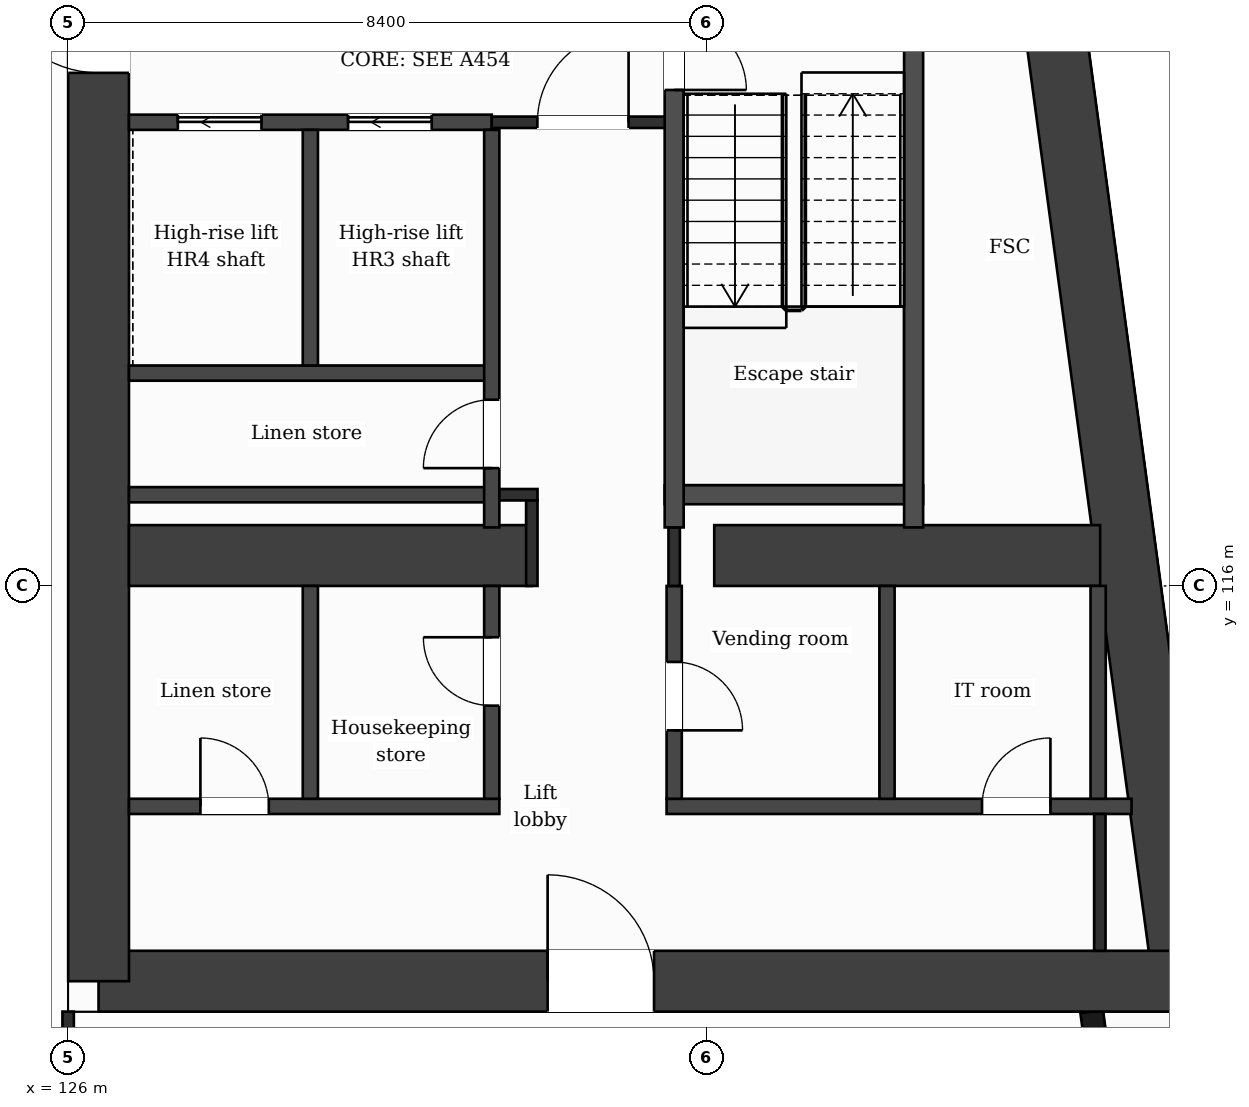
"""IFC4 building model, lengths in metres.
Left out: names, types, materials, properties, quantities, classifications, styles, units other than length and angle.
Written with IfcOpenShell. Run it as: python <this file> out.ifc"""

import sys

from ifc_helpers import new_model, si_unit, direction, frame, frame_2d, origin, place, context, subcontext, project, spatial, rectangle, extrude, element, fill, save


model = new_model("IFC4")
c1 = context("Model", 3, precision=1e-05, world=origin(), true_north=direction((0.0, 1.0)))
c2 = subcontext(c1, "Body", "Model", "MODEL_VIEW")
j1 = project(units=[si_unit("LENGTHUNIT", "METRE"), si_unit("PLANEANGLEUNIT", "RADIAN")], contexts=[c1])
p1 = place(None, origin())
s1 = spatial("IfcSite", under=j1, at=p1, CompositionType="ELEMENT")
p2 = place(p1, origin())
s2 = spatial("IfcBuilding", under=s1, at=p2, CompositionType="ELEMENT")
p3 = place(p2, frame((0.0, 0.0, 220.7)))
s3 = spatial("IfcBuildingStorey", under=s2, at=p3, CompositionType="ELEMENT", Elevation=220.7)
p4 = place(p3, frame((137.82, 132.0, 0.0), z_axis=(0.0, 0.0, 1.0), x_axis=(0.133408347329, -0.991061154956, 0.0)))
e1 = element("IfcWall", 1, at=p4, inside=s3, PredefinedType="SHEAR", context=c2, shape_type="SweptSolid", body=[
    extrude(rectangle(XDim=21.391, YDim=0.8, at=frame_2d((10.696, 0.0))), origin(), (0.0, 0.0, 1.0), 3.7),
])
p5 = place(p3, frame((140.673, 110.8, 0.0), z_axis=(0.0, 0.0, 1.0), x_axis=(-1.0, 0.0, 0.0)))
e2 = element("IfcWall", 2, at=p5, inside=s3, PredefinedType="SHEAR", context=c2, shape_type="SweptSolid", body=[
    extrude(rectangle(XDim=14.273, YDim=0.8, at=frame_2d((7.137, 0.0))), origin(), (0.0, 0.0, 1.0), 3.7),
])
p6 = place(p5, frame((6.965, 0.0, 0.0)))
e3 = element("IfcOpeningElement", 3, at=p6, cuts=e2, PredefinedType="OPENING", context=c2, shape_type="SweptSolid", body=[
    extrude(rectangle(XDim=1.4, YDim=2.1, at=frame_2d((0.7, 1.05))), frame((0.0, 0.41, 0.0), z_axis=(0.0, -1.0, 0.0), x_axis=(1.0, 0.0, 0.0)), (0.0, 0.0, 1.0), 0.82),
])
p7 = place(p3, frame((126.4, 110.8, 0.0), z_axis=(0.0, 0.0, 1.0), x_axis=(0.0, 1.0, 0.0)))
e4 = element("IfcWall", 4, at=p7, inside=s3, PredefinedType="SHEAR", context=c2, shape_type="SweptSolid", body=[
    extrude(rectangle(XDim=21.2, YDim=0.8, at=frame_2d((10.6, 0.0))), origin(), (0.0, 0.0, 1.0), 3.7),
])
p8 = place(p7, frame((11.95, 0.0, 0.0)))
e5 = element("IfcOpeningElement", 5, at=p8, cuts=e4, PredefinedType="OPENING", context=c2, shape_type="SweptSolid", body=[
    extrude(rectangle(XDim=1.4, YDim=2.1, at=frame_2d((0.7, 1.05))), frame((0.0, 0.41, 0.0), z_axis=(0.0, -1.0, 0.0), x_axis=(1.0, 0.0, 0.0)), (0.0, 0.0, 1.0), 0.82),
])
p9 = place(p3, frame((126.8, 116.4, 0.0), z_axis=(0.0, 0.0, 1.0), x_axis=(1.0, 0.0, 0.0)))
e6 = element("IfcWall", 6, at=p9, inside=s3, PredefinedType="SHEAR", context=c2, shape_type="SweptSolid", body=[
    extrude(rectangle(XDim=5.3, YDim=0.8, at=frame_2d((2.65, 0.0))), origin(), (0.0, 0.0, 1.0), 3.7),
])
p10 = place(p3, frame((134.5, 116.4, 0.0), z_axis=(0.0, 0.0, 1.0), x_axis=(1.0, 0.0, 0.0)))
e7 = element("IfcWall", 7, at=p10, inside=s3, PredefinedType="SHEAR", context=c2, shape_type="SweptSolid", body=[
    extrude(rectangle(XDim=5.077, YDim=0.8, at=frame_2d((2.539, 0.0))), origin(), (0.0, 0.0, 1.0), 3.7),
])
p11 = place(p3, frame((140.348, 103.85, 0.0), z_axis=(0.0, 0.0, 1.0), x_axis=(-0.133431549479, 0.991058031401, 0.0)))
e8 = element("IfcWall", 8, at=p11, inside=s3, PredefinedType="SOLIDWALL", context=c2, shape_type="SweptSolid", body=[
    extrude(rectangle(XDim=6.609, YDim=0.3, at=frame_2d((3.304, 0.0))), origin(), (0.0, 0.0, 1.0), 3.38),
])
p12 = place(p11, frame((0.737, 0.0, 0.9)))
e9 = element("IfcOpeningElement", 9, at=p12, cuts=e8, PredefinedType="OPENING", context=c2, shape_type="SweptSolid", body=[
    extrude(rectangle(XDim=1.2, YDim=2.1, at=frame_2d((0.6, 1.05))), frame((0.0, 0.16, 0.0), z_axis=(0.0, -1.0, 0.0), x_axis=(1.0, 0.0, 0.0)), (0.0, 0.0, 1.0), 0.32),
])
p13 = place(p11, frame((3.991, 0.0, 0.0)))
e10 = element("IfcOpeningElement", 10, at=p13, cuts=e8, PredefinedType="OPENING", context=c2, shape_type="SweptSolid", body=[
    extrude(rectangle(XDim=1.2, YDim=2.4, at=frame_2d((0.6, 1.2))), frame((0.0, 0.16, 0.0), z_axis=(0.0, -1.0, 0.0), x_axis=(1.0, 0.0, 0.0)), (0.0, 0.0, 1.0), 0.32),
])
p14 = place(p3, frame((126.8, 113.1, 0.0), z_axis=(0.0, 0.0, 1.0), x_axis=(1.0, 0.0, 0.0)))
e11 = element("IfcWall", 11, at=p14, inside=s3, PredefinedType="PARTITIONING", context=c2, shape_type="SweptSolid", body=[
    extrude(rectangle(XDim=4.873, YDim=0.2, at=frame_2d((2.437, 0.0))), origin(), (0.0, 0.0, 1.0), 3.38),
])
p15 = place(p14, frame((0.94, 0.0, 0.0)))
e12 = element("IfcOpeningElement", 12, at=p15, cuts=e11, PredefinedType="OPENING", context=c2, shape_type="SweptSolid", body=[
    extrude(rectangle(XDim=0.9, YDim=2.1, at=frame_2d((0.45, 1.05))), frame((0.0, 0.11, 0.0), z_axis=(0.0, -1.0, 0.0), x_axis=(1.0, 0.0, 0.0)), (0.0, 0.0, 1.0), 0.22),
])
p16 = place(p3, frame((133.873, 113.1, 0.0), z_axis=(0.0, 0.0, 1.0), x_axis=(1.0, 0.0, 0.0)))
e13 = element("IfcWall", 13, at=p16, inside=s3, PredefinedType="PARTITIONING", context=c2, shape_type="SweptSolid", body=[
    extrude(rectangle(XDim=6.117, YDim=0.2, at=frame_2d((3.059, 0.0))), origin(), (0.0, 0.0, 1.0), 3.38),
])
p17 = place(p16, frame((4.15, 0.0, 0.0)))
e14 = element("IfcOpeningElement", 14, at=p17, cuts=e13, PredefinedType="OPENING", context=c2, shape_type="SweptSolid", body=[
    extrude(rectangle(XDim=0.9, YDim=2.1, at=frame_2d((0.45, 1.05))), frame((0.0, 0.11, 0.0), z_axis=(0.0, -1.0, 0.0), x_axis=(1.0, 0.0, 0.0)), (0.0, 0.0, 1.0), 0.22),
])
p18 = place(p3, frame((126.8, 117.2, 0.0), z_axis=(0.0, 0.0, 1.0), x_axis=(1.0, 0.0, 0.0)))
e15 = element("IfcWall", 15, at=p18, inside=s3, PredefinedType="PARTITIONING", context=c2, shape_type="SweptSolid", body=[
    extrude(rectangle(XDim=4.773, YDim=0.2, at=frame_2d((2.386, 0.0))), origin(), (0.0, 0.0, 1.0), 3.38),
])
p19 = place(p3, frame((131.573, 117.2, 0.0), z_axis=(0.0, 0.0, 1.0), x_axis=(1.0, 0.0, 0.0)))
e16 = element("IfcWall", 16, at=p19, inside=s3, PredefinedType="PARTITIONING", context=c2, shape_type="SweptSolid", body=[
    extrude(rectangle(XDim=0.602, YDim=0.15, at=frame_2d((0.301, 0.0))), origin(), (0.0, 0.0, 1.0), 3.38),
])
p20 = place(p3, frame((133.848, 117.2, 0.0), z_axis=(0.0, 0.0, 1.0), x_axis=(1.0, 0.0, 0.0)))
e17 = element("IfcWall", 17, at=p20, inside=s3, PredefinedType="PARTITIONING", context=c2, shape_type="SweptSolid", body=[
    extrude(rectangle(XDim=3.4, YDim=0.25, at=frame_2d((1.7, 0.0))), origin(), (0.0, 0.0, 1.0), 3.38),
])
p21 = place(p3, frame((126.8, 118.8, 0.0), z_axis=(0.0, 0.0, 1.0), x_axis=(1.0, 0.0, 0.0)))
e18 = element("IfcWall", 18, at=p21, inside=s3, PredefinedType="PARTITIONING", context=c2, shape_type="SweptSolid", body=[
    extrude(rectangle(XDim=4.773, YDim=0.2, at=frame_2d((2.386, 0.0))), origin(), (0.0, 0.0, 1.0), 3.38),
])
p22 = place(p3, frame((126.8, 122.1, 0.0), z_axis=(0.0, 0.0, 1.0), x_axis=(1.0, 0.0, 0.0)))
e19 = element("IfcWall", 19, at=p22, inside=s3, PredefinedType="PARTITIONING", context=c2, shape_type="SweptSolid", body=[
    extrude(rectangle(XDim=4.773, YDim=0.2, at=frame_2d((2.386, 0.0))), origin(), (0.0, 0.0, 1.0), 3.38),
])
p23 = place(p22, frame((2.883, 0.0, 0.0)))
e20 = element("IfcOpeningElement", 20, at=p23, cuts=e19, PredefinedType="OPENING", context=c2, shape_type="SweptSolid", body=[
    extrude(rectangle(XDim=1.1, YDim=2.1, at=frame_2d((0.55, 1.05))), frame((0.0, 0.11, 0.0), z_axis=(0.0, -1.0, 0.0), x_axis=(1.0, 0.0, 0.0)), (0.0, 0.0, 1.0), 0.22),
])
p24 = place(p22, frame((0.643, 0.0, 0.0)))
e21 = element("IfcOpeningElement", 21, at=p24, cuts=e19, PredefinedType="OPENING", context=c2, shape_type="SweptSolid", body=[
    extrude(rectangle(XDim=1.1, YDim=2.1, at=frame_2d((0.55, 1.05))), frame((0.0, 0.11, 0.0), z_axis=(0.0, -1.0, 0.0), x_axis=(1.0, 0.0, 0.0)), (0.0, 0.0, 1.0), 0.22),
])
p25 = place(p3, frame((131.573, 122.1, 0.0), z_axis=(0.0, 0.0, 1.0), x_axis=(1.0, 0.0, 0.0)))
e22 = element("IfcWall", 22, at=p25, inside=s3, PredefinedType="PARTITIONING", context=c2, shape_type="SweptSolid", body=[
    extrude(rectangle(XDim=2.4, YDim=0.15, at=frame_2d((1.2, 0.0))), origin(), (0.0, 0.0, 1.0), 3.38),
])
p26 = place(p25, frame((0.6, 0.0, 0.0)))
e23 = element("IfcOpeningElement", 23, at=p26, cuts=e22, PredefinedType="OPENING", context=c2, shape_type="SweptSolid", body=[
    extrude(rectangle(XDim=1.2, YDim=2.1, at=frame_2d((0.6, 1.05))), frame((0.0, 0.085, 0.0), z_axis=(0.0, -1.0, 0.0), x_axis=(1.0, 0.0, 0.0)), (0.0, 0.0, 1.0), 0.17),
])
p27 = place(p3, frame((126.0, 109.075, 0.0), z_axis=(0.0, 0.0, 1.0), x_axis=(0.0, 1.0, 0.0)))
e24 = element("IfcWall", 24, at=p27, inside=s3, PredefinedType="PARTITIONING", context=c2, shape_type="SweptSolid", body=[
    extrude(rectangle(XDim=1.325, YDim=0.15, at=frame_2d((0.663, 0.0))), origin(), (0.0, 0.0, 1.0), 3.38),
])
p28 = place(p3, frame((129.187, 113.2, 0.0), z_axis=(0.0, 0.0, 1.0), x_axis=(0.0, 1.0, 0.0)))
e25 = element("IfcWall", 25, at=p28, inside=s3, PredefinedType="PARTITIONING", context=c2, shape_type="SweptSolid", body=[
    extrude(rectangle(XDim=2.8, YDim=0.2, at=frame_2d((1.4, 0.0))), origin(), (0.0, 0.0, 1.0), 3.38),
])
p29 = place(p3, frame((129.187, 118.9, 0.0), z_axis=(0.0, 0.0, 1.0), x_axis=(0.0, 1.0, 0.0)))
e26 = element("IfcWall", 26, at=p29, inside=s3, PredefinedType="PARTITIONING", context=c2, shape_type="SweptSolid", body=[
    extrude(rectangle(XDim=3.1, YDim=0.2, at=frame_2d((1.55, 0.0))), origin(), (0.0, 0.0, 1.0), 3.38),
])
p30 = place(p3, frame((131.573, 113.2, 0.0), z_axis=(0.0, 0.0, 1.0), x_axis=(0.0, 1.0, 0.0)))
e27 = element("IfcWall", 27, at=p30, inside=s3, PredefinedType="PARTITIONING", context=c2, shape_type="SweptSolid", body=[
    extrude(rectangle(XDim=2.8, YDim=0.2, at=frame_2d((1.4, 0.0))), origin(), (0.0, 0.0, 1.0), 3.38),
])
p31 = place(p30, frame((1.225, 0.0, 0.0)))
e28 = element("IfcOpeningElement", 28, at=p31, cuts=e27, PredefinedType="OPENING", context=c2, shape_type="SweptSolid", body=[
    extrude(rectangle(XDim=0.9, YDim=2.1, at=frame_2d((0.45, 1.05))), frame((0.0, 0.11, 0.0), z_axis=(0.0, -1.0, 0.0), x_axis=(1.0, 0.0, 0.0)), (0.0, 0.0, 1.0), 0.22),
])
p32 = place(p3, frame((131.573, 116.77, 0.0), z_axis=(0.0, 0.0, 1.0), x_axis=(0.0, 1.0, 0.0)))
e29 = element("IfcWall", 29, at=p32, inside=s3, PredefinedType="PARTITIONING", context=c2, shape_type="SweptSolid", body=[
    extrude(rectangle(XDim=5.23, YDim=0.2, at=frame_2d((2.615, 0.0))), origin(), (0.0, 0.0, 1.0), 3.38),
])
p33 = place(p32, frame((0.78, 0.0, 0.0)))
e30 = element("IfcOpeningElement", 30, at=p33, cuts=e29, PredefinedType="OPENING", context=c2, shape_type="SweptSolid", body=[
    extrude(rectangle(XDim=0.9, YDim=2.1, at=frame_2d((0.45, 1.05))), frame((0.0, 0.11, 0.0), z_axis=(0.0, -1.0, 0.0), x_axis=(1.0, 0.0, 0.0)), (0.0, 0.0, 1.0), 0.22),
])
p34 = place(p3, frame((132.1, 116.0, 0.0), z_axis=(0.0, 0.0, 1.0), x_axis=(0.0, 1.0, 0.0)))
e31 = element("IfcWall", 31, at=p34, inside=s3, PredefinedType="PARTITIONING", context=c2, shape_type="SweptSolid", body=[
    extrude(rectangle(XDim=1.125, YDim=0.15, at=frame_2d((0.562, 0.0))), origin(), (0.0, 0.0, 1.0), 3.38),
])
p35 = place(p3, frame((133.973, 113.2, 0.0), z_axis=(0.0, 0.0, 1.0), x_axis=(0.0, 1.0, 0.0)))
e32 = element("IfcWall", 32, at=p35, inside=s3, PredefinedType="PARTITIONING", context=c2, shape_type="SweptSolid", body=[
    extrude(rectangle(XDim=2.8, YDim=0.2, at=frame_2d((1.4, 0.0))), origin(), (0.0, 0.0, 1.0), 3.38),
])
p36 = place(p35, frame((0.9, 0.0, 0.0)))
e33 = element("IfcOpeningElement", 33, at=p36, cuts=e32, PredefinedType="OPENING", context=c2, shape_type="SweptSolid", body=[
    extrude(rectangle(XDim=0.9, YDim=2.1, at=frame_2d((0.45, 1.05))), frame((0.0, 0.11, 0.0), z_axis=(0.0, -1.0, 0.0), x_axis=(1.0, 0.0, 0.0)), (0.0, 0.0, 1.0), 0.22),
])
p37 = place(p3, frame((133.973, 116.0, 0.0), z_axis=(0.0, 0.0, 1.0), x_axis=(0.0, 1.0, 0.0)))
e34 = element("IfcWall", 34, at=p37, inside=s3, PredefinedType="PARTITIONING", context=c2, shape_type="SweptSolid", body=[
    extrude(rectangle(XDim=0.77, YDim=0.15, at=frame_2d((0.385, 0.0))), origin(), (0.0, 0.0, 1.0), 3.38),
])
p38 = place(p3, frame((133.973, 116.77, 0.0), z_axis=(0.0, 0.0, 1.0), x_axis=(0.0, 1.0, 0.0)))
e35 = element("IfcWall", 35, at=p38, inside=s3, PredefinedType="PARTITIONING", context=c2, shape_type="SweptSolid", body=[
    extrude(rectangle(XDim=7.055, YDim=0.25, at=frame_2d((3.527, 0.0))), origin(), (0.0, 0.0, 1.0), 3.38),
])
p39 = place(p38, frame((5.755, 0.0, 0.0)))
e36 = element("IfcOpeningElement", 36, at=p39, cuts=e35, PredefinedType="OPENING", context=c2, shape_type="SweptSolid", body=[
    extrude(rectangle(XDim=0.95, YDim=2.1, at=frame_2d((0.475, 1.05))), frame((0.0, 0.135, 0.0), z_axis=(0.0, -1.0, 0.0), x_axis=(1.0, 0.0, 0.0)), (0.0, 0.0, 1.0), 0.27),
])
p40 = place(p3, frame((136.773, 113.2, 0.0), z_axis=(0.0, 0.0, 1.0), x_axis=(0.0, 1.0, 0.0)))
e37 = element("IfcWall", 37, at=p40, inside=s3, PredefinedType="PARTITIONING", context=c2, shape_type="SweptSolid", body=[
    extrude(rectangle(XDim=2.8, YDim=0.2, at=frame_2d((1.4, 0.0))), origin(), (0.0, 0.0, 1.0), 3.38),
])
p41 = place(p3, frame((137.123, 116.77, 0.0), z_axis=(0.0, 0.0, 1.0), x_axis=(0.0, 1.0, 0.0)))
e38 = element("IfcWall", 38, at=p41, inside=s3, PredefinedType="PARTITIONING", context=c2, shape_type="SweptSolid", body=[
    extrude(rectangle(XDim=7.055, YDim=0.25, at=frame_2d((3.527, 0.0))), origin(), (0.0, 0.0, 1.0), 3.38),
])
p42 = place(p3, frame((139.551, 113.2, 0.0), z_axis=(0.0, 0.0, 1.0), x_axis=(0.0, 1.0, 0.0)))
e39 = element("IfcWall", 39, at=p42, inside=s3, PredefinedType="PARTITIONING", context=c2, shape_type="SweptSolid", body=[
    extrude(rectangle(XDim=2.8, YDim=0.2, at=frame_2d((1.4, 0.0))), origin(), (0.0, 0.0, 1.0), 3.38),
])
p43 = place(p3, frame((139.573, 111.2, 0.0), z_axis=(0.0, 0.0, 1.0), x_axis=(0.0, 1.0, 0.0)))
e40 = element("IfcWall", 40, at=p43, inside=s3, PredefinedType="PARTITIONING", context=c2, shape_type="SweptSolid", body=[
    extrude(rectangle(XDim=1.8, YDim=0.15, at=frame_2d((0.9, 0.0))), origin(), (0.0, 0.0, 1.0), 3.38),
])
p44 = place(p26, origin())
e41 = element("IfcDoor", 41, at=p44, inside=s3, OperationType="SINGLE_SWING_RIGHT", PredefinedType="DOOR", context=c2, shape_type="SweptSolid", body=[
    extrude(rectangle(XDim=1.2, YDim=2.1, at=frame_2d((0.6, 1.05))), frame((0.0, 0.025, 0.0), z_axis=(0.0, -1.0, 0.0), x_axis=(1.0, 0.0, 0.0)), (0.0, 0.0, 1.0), 0.05),
])
fill(e23, e41)
p45 = place(p23, origin())
e42 = element("IfcDoor", 42, at=p45, inside=s3, OperationType="SLIDING_TO_LEFT", PredefinedType="DOOR", context=c2, shape_type="SweptSolid", body=[
    extrude(rectangle(XDim=1.1, YDim=2.1, at=frame_2d((0.55, 1.05))), frame((0.0, 0.025, 0.0), z_axis=(0.0, -1.0, 0.0), x_axis=(1.0, 0.0, 0.0)), (0.0, 0.0, 1.0), 0.05),
])
fill(e20, e42)
p46 = place(p24, origin())
e43 = element("IfcDoor", 43, at=p46, inside=s3, OperationType="SLIDING_TO_LEFT", PredefinedType="DOOR", context=c2, shape_type="SweptSolid", body=[
    extrude(rectangle(XDim=1.1, YDim=2.1, at=frame_2d((0.55, 1.05))), frame((0.0, 0.025, 0.0), z_axis=(0.0, -1.0, 0.0), x_axis=(1.0, 0.0, 0.0)), (0.0, 0.0, 1.0), 0.05),
])
fill(e21, e43)
p47 = place(p39, origin())
e44 = element("IfcDoor", 44, at=p47, inside=s3, OperationType="SINGLE_SWING_LEFT", PredefinedType="DOOR", context=c2, shape_type="SweptSolid", body=[
    extrude(rectangle(XDim=0.95, YDim=2.1, at=frame_2d((0.475, 1.05))), frame((0.0, 0.025, 0.0), z_axis=(0.0, -1.0, 0.0), x_axis=(1.0, 0.0, 0.0)), (0.0, 0.0, 1.0), 0.05),
])
fill(e36, e44)
p48 = place(p33, origin())
e45 = element("IfcDoor", 45, at=p48, inside=s3, OperationType="SINGLE_SWING_LEFT", PredefinedType="DOOR", context=c2, shape_type="SweptSolid", body=[
    extrude(rectangle(XDim=0.9, YDim=2.1, at=frame_2d((0.45, 1.05))), frame((0.0, 0.025, 0.0), z_axis=(0.0, -1.0, 0.0), x_axis=(1.0, 0.0, 0.0)), (0.0, 0.0, 1.0), 0.05),
])
fill(e30, e45)
p49 = place(p17, origin())
e46 = element("IfcDoor", 46, at=p49, inside=s3, OperationType="SINGLE_SWING_RIGHT", PredefinedType="DOOR", context=c2, shape_type="SweptSolid", body=[
    extrude(rectangle(XDim=0.9, YDim=2.1, at=frame_2d((0.45, 1.05))), frame((0.0, 0.025, 0.0), z_axis=(0.0, -1.0, 0.0), x_axis=(1.0, 0.0, 0.0)), (0.0, 0.0, 1.0), 0.05),
])
fill(e14, e46)
p50 = place(p36, origin())
e47 = element("IfcDoor", 47, at=p50, inside=s3, OperationType="SINGLE_SWING_LEFT", PredefinedType="DOOR", context=c2, shape_type="SweptSolid", body=[
    extrude(rectangle(XDim=0.9, YDim=2.1, at=frame_2d((0.45, 1.05))), frame((0.0, 0.025, 0.0), z_axis=(0.0, -1.0, 0.0), x_axis=(1.0, 0.0, 0.0)), (0.0, 0.0, 1.0), 0.05),
])
fill(e33, e47)
p51 = place(p31, origin())
e48 = element("IfcDoor", 48, at=p51, inside=s3, OperationType="SINGLE_SWING_RIGHT", PredefinedType="DOOR", context=c2, shape_type="SweptSolid", body=[
    extrude(rectangle(XDim=0.9, YDim=2.1, at=frame_2d((0.45, 1.05))), frame((0.0, 0.025, 0.0), z_axis=(0.0, -1.0, 0.0), x_axis=(1.0, 0.0, 0.0)), (0.0, 0.0, 1.0), 0.05),
])
fill(e28, e48)
p52 = place(p15, origin())
e49 = element("IfcDoor", 49, at=p52, inside=s3, OperationType="SINGLE_SWING_LEFT", PredefinedType="DOOR", context=c2, shape_type="SweptSolid", body=[
    extrude(rectangle(XDim=0.9, YDim=2.1, at=frame_2d((0.45, 1.05))), frame((0.0, 0.025, 0.0), z_axis=(0.0, -1.0, 0.0), x_axis=(1.0, 0.0, 0.0)), (0.0, 0.0, 1.0), 0.05),
])
fill(e12, e49)
p53 = place(p6, origin())
e50 = element("IfcDoor", 50, at=p53, inside=s3, OperationType="SINGLE_SWING_RIGHT", PredefinedType="DOOR", context=c2, shape_type="SweptSolid", body=[
    extrude(rectangle(XDim=1.4, YDim=2.1, at=frame_2d((0.7, 1.05))), frame((0.0, 0.025, 0.0), z_axis=(0.0, -1.0, 0.0), x_axis=(1.0, 0.0, 0.0)), (0.0, 0.0, 1.0), 0.05),
])
fill(e3, e50)
p54 = place(p8, origin())
e51 = element("IfcDoor", 51, at=p54, inside=s3, OperationType="SINGLE_SWING_RIGHT", PredefinedType="DOOR", context=c2, shape_type="SweptSolid", body=[
    extrude(rectangle(XDim=1.4, YDim=2.1, at=frame_2d((0.7, 1.05))), frame((0.0, 0.025, 0.0), z_axis=(0.0, -1.0, 0.0), x_axis=(1.0, 0.0, 0.0)), (0.0, 0.0, 1.0), 0.05),
])
fill(e5, e51)
save(model, sys.argv[1])
